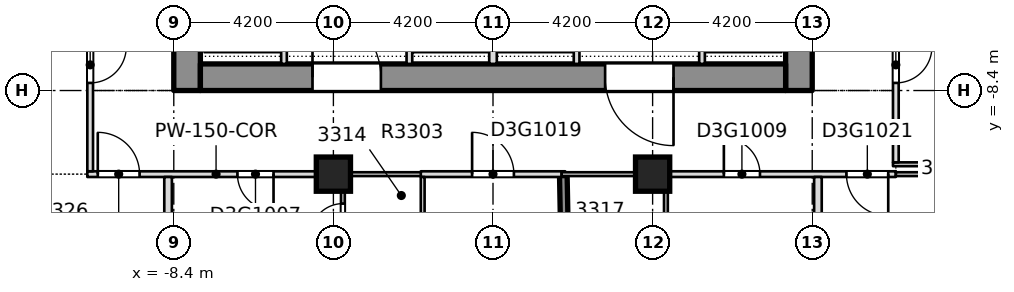
"""IFC4 building model, lengths in metres.
Left out: names, types, materials, properties, quantities, classifications, styles, units other than length and angle.
Written with IfcOpenShell. Run it as: python <this file> out.ifc"""

import sys

from ifc_helpers import new_model, si_unit, direction, frame, frame_2d, origin, origin_2d, place, context, subcontext, project, spatial, rectangle, extrude, element, fill, save


model = new_model("IFC4")
c1 = context("Model", 3, precision=1e-05, world=origin(), true_north=direction((0.0, 1.0)))
c2 = subcontext(c1, "Body", "Model", "MODEL_VIEW")
j1 = project(units=[si_unit("LENGTHUNIT", "METRE"), si_unit("PLANEANGLEUNIT", "RADIAN")], contexts=[c1])
p1 = place(None, origin())
s1 = spatial("IfcSite", under=j1, at=p1, CompositionType="ELEMENT")
p2 = place(p1, origin())
s2 = spatial("IfcBuilding", under=s1, at=p2, CompositionType="ELEMENT")
p3 = place(p2, frame((0.0, 0.0, 133.1)))
s3 = spatial("IfcBuildingStorey", under=s2, at=p3, CompositionType="ELEMENT", Elevation=133.1)
p4 = place(p3, frame((8.05, -8.4, -0.4), z_axis=(0.0, 0.0, 1.0), x_axis=(0.0, 1.0, 0.0)))
e1 = element("IfcWall", 1, at=p4, inside=s3, PredefinedType="SOLIDWALL", context=c2, shape_type="SweptSolid", body=[
    extrude(rectangle(XDim=30.15, YDim=0.7, at=frame_2d((15.075, 0.0))), origin(), (0.0, 0.0, 1.0), 3.45),
])
p5 = place(p4, frame((19.3, 0.0, 0.4)))
e2 = element("IfcOpeningElement", 2, at=p5, cuts=e1, PredefinedType="OPENING", context=c2, shape_type="SweptSolid", body=[
    extrude(rectangle(XDim=1.2, YDim=2.1, at=frame_2d((0.6, 1.05))), frame((0.0, 0.36, 0.0), z_axis=(0.0, -1.0, 0.0), x_axis=(1.0, 0.0, 0.0)), (0.0, 0.0, 1.0), 0.72),
])
p6 = place(p3, frame((-8.05, -8.4, -0.4), z_axis=(0.0, 0.0, 1.0), x_axis=(0.0, 1.0, 0.0)))
e3 = element("IfcWall", 3, at=p6, inside=s3, PredefinedType="SOLIDWALL", context=c2, shape_type="SweptSolid", body=[
    extrude(rectangle(XDim=30.15, YDim=0.7, at=frame_2d((15.075, 0.0))), origin(), (0.0, 0.0, 1.0), 3.45),
])
p7 = place(p6, frame((19.3, 0.0, 0.4)))
e4 = element("IfcOpeningElement", 4, at=p7, cuts=e3, PredefinedType="OPENING", context=c2, shape_type="SweptSolid", body=[
    extrude(rectangle(XDim=1.2, YDim=2.1, at=frame_2d((0.6, 1.05))), frame((0.0, 0.36, 0.0), z_axis=(0.0, -1.0, 0.0), x_axis=(1.0, 0.0, 0.0)), (0.0, 0.0, 1.0), 0.72),
])
p8 = place(p3, frame((-7.7, -8.05, -0.4), z_axis=(0.0, 0.0, 1.0), x_axis=(1.0, 0.0, 0.0)))
e5 = element("IfcWall", 5, at=p8, inside=s3, PredefinedType="SHEAR", context=c2, shape_type="SweptSolid", body=[
    extrude(rectangle(XDim=15.4, YDim=0.7, at=frame_2d((7.7, 0.0))), origin(), (0.0, 0.0, 1.0), 3.45),
])
p9 = place(p8, frame((2.95, 0.0, 0.4)))
e6 = element("IfcOpeningElement", 6, at=p9, cuts=e5, PredefinedType="OPENING", context=c2, shape_type="SweptSolid", body=[
    extrude(rectangle(XDim=1.8, YDim=2.1, at=frame_2d((0.9, 1.05))), frame((0.0, 0.36, 0.0), z_axis=(0.0, -1.0, 0.0), x_axis=(1.0, 0.0, 0.0)), (0.0, 0.0, 1.0), 0.72),
])
p10 = place(p8, frame((10.65, 0.0, 0.4)))
e7 = element("IfcOpeningElement", 7, at=p10, cuts=e5, PredefinedType="OPENING", context=c2, shape_type="SweptSolid", body=[
    extrude(rectangle(XDim=1.8, YDim=2.1, at=frame_2d((0.9, 1.05))), frame((0.0, 0.36, 0.0), z_axis=(0.0, -1.0, 0.0), x_axis=(1.0, 0.0, 0.0)), (0.0, 0.0, 1.0), 0.72),
])
for number, where, z_axis, x_axis in (
    (8, (-4.2, -10.6, -0.4), (0.0, 0.0, 1.0), (1.0, 0.0, 0.0)),
    (9, (4.2, -10.6, -0.4), (0.0, 0.0, 1.0), (1.0, 0.0, 0.0)),
):
    element("IfcColumn", number, at=place(p3, frame(where, z_axis=z_axis, x_axis=x_axis)), inside=s3, PredefinedType="COLUMN", context=c2, shape_type="SweptSolid", body=[
        extrude(rectangle(XDim=0.9, YDim=0.9, at=origin_2d()), origin(), (0.0, 0.0, 1.0), 3.45),
    ])
p11 = place(p3, frame((-10.675, -10.6, 0.0), z_axis=(0.0, 0.0, 1.0), x_axis=(1.0, 0.0, 0.0)))
e10 = element("IfcWall", 10, at=p11, inside=s3, PredefinedType="PARTITIONING", context=c2, shape_type="SweptSolid", body=[
    extrude(rectangle(XDim=6.775, YDim=0.15, at=frame_2d((3.388, 0.0))), origin(), (0.0, 0.0, 1.0), 3.05),
])
p12 = place(p11, frame((3.95, 0.0, 0.0)))
e11 = element("IfcOpeningElement", 11, at=p12, cuts=e10, PredefinedType="OPENING", context=c2, shape_type="SweptSolid", body=[
    extrude(rectangle(XDim=0.95, YDim=2.1, at=frame_2d((0.475, 1.05))), frame((0.0, 0.085, 0.0), z_axis=(0.0, -1.0, 0.0), x_axis=(1.0, 0.0, 0.0)), (0.0, 0.0, 1.0), 0.17),
])
p13 = place(p11, frame((0.275, 0.0, 0.0)))
e12 = element("IfcOpeningElement", 12, at=p13, cuts=e10, PredefinedType="OPENING", context=c2, shape_type="SweptSolid", body=[
    extrude(rectangle(XDim=1.1, YDim=2.1, at=frame_2d((0.55, 1.05))), frame((0.0, 0.085, 0.0), z_axis=(0.0, -1.0, 0.0), x_axis=(1.0, 0.0, 0.0)), (0.0, 0.0, 1.0), 0.17),
])
p14 = place(p3, frame((-4.0, -10.6, 0.0), z_axis=(0.0, 0.0, 1.0), x_axis=(1.0, 0.0, 0.0)))
e13 = element("IfcWall", 13, at=p14, inside=s3, PredefinedType="PARTITIONING", context=c2, shape_type="SweptSolid", body=[
    extrude(rectangle(XDim=2.2, YDim=0.1, at=frame_2d((1.1, 0.0))), origin(), (0.0, 0.0, 1.0), 3.05),
])
p15 = place(p3, frame((-1.9, -10.6, 0.0), z_axis=(0.0, 0.0, 1.0), x_axis=(1.0, 0.0, 0.0)))
e14 = element("IfcWall", 14, at=p15, inside=s3, PredefinedType="PARTITIONING", context=c2, shape_type="SweptSolid", body=[
    extrude(rectangle(XDim=3.8, YDim=0.15, at=frame_2d((1.9, 0.0))), origin(), (0.0, 0.0, 1.0), 3.05),
])
p16 = place(p15, frame((1.35, 0.0, 0.0)))
e15 = element("IfcOpeningElement", 15, at=p16, cuts=e14, PredefinedType="OPENING", context=c2, shape_type="SweptSolid", body=[
    extrude(rectangle(XDim=1.1, YDim=2.1, at=frame_2d((0.55, 1.05))), frame((0.0, 0.085, 0.0), z_axis=(0.0, -1.0, 0.0), x_axis=(1.0, 0.0, 0.0)), (0.0, 0.0, 1.0), 0.17),
])
p17 = place(p3, frame((1.8, -10.6, 0.0), z_axis=(0.0, 0.0, 1.0), x_axis=(1.0, 0.0, 0.0)))
e16 = element("IfcWall", 16, at=p17, inside=s3, PredefinedType="PARTITIONING", context=c2, shape_type="SweptSolid", body=[
    extrude(rectangle(XDim=2.8, YDim=0.1, at=frame_2d((1.4, 0.0))), origin(), (0.0, 0.0, 1.0), 3.05),
])
p18 = place(p3, frame((4.5, -10.6, 0.0), z_axis=(0.0, 0.0, 1.0), x_axis=(1.0, 0.0, 0.0)))
e17 = element("IfcWall", 17, at=p18, inside=s3, PredefinedType="PARTITIONING", context=c2, shape_type="SweptSolid", body=[
    extrude(rectangle(XDim=6.1, YDim=0.15, at=frame_2d((3.05, 0.0))), origin(), (0.0, 0.0, 1.0), 3.05),
])
p19 = place(p18, frame((1.575, 0.0, 0.0)))
e18 = element("IfcOpeningElement", 18, at=p19, cuts=e17, PredefinedType="OPENING", context=c2, shape_type="SweptSolid", body=[
    extrude(rectangle(XDim=0.95, YDim=2.1, at=frame_2d((0.475, 1.05))), frame((0.0, 0.085, 0.0), z_axis=(0.0, -1.0, 0.0), x_axis=(1.0, 0.0, 0.0)), (0.0, 0.0, 1.0), 0.17),
])
p20 = place(p18, frame((4.8, 0.0, 0.0)))
e19 = element("IfcOpeningElement", 19, at=p20, cuts=e17, PredefinedType="OPENING", context=c2, shape_type="SweptSolid", body=[
    extrude(rectangle(XDim=1.1, YDim=2.1, at=frame_2d((0.55, 1.05))), frame((0.0, 0.085, 0.0), z_axis=(0.0, -1.0, 0.0), x_axis=(1.0, 0.0, 0.0)), (0.0, 0.0, 1.0), 0.17),
])
p21 = place(p3, frame((10.6, -10.6, 0.0), z_axis=(0.0, 0.0, 1.0), x_axis=(1.0, 0.0, 0.0)))
e20 = element("IfcWall", 20, at=p21, inside=s3, PredefinedType="PARTITIONING", context=c2, shape_type="SweptSolid", body=[
    extrude(rectangle(XDim=1.7, YDim=0.1, at=frame_2d((0.85, 0.0))), origin(), (0.0, 0.0, 1.0), 3.05),
])
p22 = place(p3, frame((10.525, -10.34, 0.0), z_axis=(0.0, 0.0, 1.0), x_axis=(1.0, 0.0, 0.0)))
e21 = element("IfcWall", 21, at=p22, inside=s3, PredefinedType="PARTITIONING", context=c2, shape_type="SweptSolid", body=[
    extrude(rectangle(XDim=2.825, YDim=0.1, at=frame_2d((1.413, 0.0))), origin(), (0.0, 0.0, 1.0), 3.05),
])
p23 = place(p3, frame((-10.6, -10.525, 0.0), z_axis=(0.0, 0.0, 1.0), x_axis=(0.0, 1.0, 0.0)))
e22 = element("IfcWall", 22, at=p23, inside=s3, PredefinedType="PARTITIONING", context=c2, shape_type="SweptSolid", body=[
    extrude(rectangle(XDim=13.875, YDim=0.15, at=frame_2d((6.938, 0.0))), origin(), (0.0, 0.0, 1.0), 3.05),
])
p24 = place(p23, frame((2.325, 0.0, 0.0)))
e23 = element("IfcOpeningElement", 23, at=p24, cuts=e22, PredefinedType="OPENING", context=c2, shape_type="SweptSolid", body=[
    extrude(rectangle(XDim=0.95, YDim=2.1, at=frame_2d((0.475, 1.05))), frame((0.0, 0.085, 0.0), z_axis=(0.0, -1.0, 0.0), x_axis=(1.0, 0.0, 0.0)), (0.0, 0.0, 1.0), 0.17),
])
p25 = place(p23, frame((9.975, 0.0, 0.0)))
e24 = element("IfcOpeningElement", 24, at=p25, cuts=e22, PredefinedType="OPENING", context=c2, shape_type="SweptSolid", body=[
    extrude(rectangle(XDim=1.1, YDim=2.1, at=frame_2d((0.55, 1.05))), frame((0.0, 0.085, 0.0), z_axis=(0.0, -1.0, 0.0), x_axis=(1.0, 0.0, 0.0)), (0.0, 0.0, 1.0), 0.17),
])
p26 = place(p23, frame((4.825, 0.0, 0.0)))
e25 = element("IfcOpeningElement", 25, at=p26, cuts=e22, PredefinedType="OPENING", context=c2, shape_type="SweptSolid", body=[
    extrude(rectangle(XDim=1.0, YDim=2.1, at=frame_2d((0.5, 1.05))), frame((0.0, 0.085, 0.0), z_axis=(0.0, -1.0, 0.0), x_axis=(1.0, 0.0, 0.0)), (0.0, 0.0, 1.0), 0.17),
])
p27 = place(p23, frame((12.225, 0.0, 0.0)))
e26 = element("IfcOpeningElement", 26, at=p27, cuts=e22, PredefinedType="OPENING", context=c2, shape_type="SweptSolid", body=[
    extrude(rectangle(XDim=1.0, YDim=2.1, at=frame_2d((0.5, 1.05))), frame((0.0, 0.085, 0.0), z_axis=(0.0, -1.0, 0.0), x_axis=(1.0, 0.0, 0.0)), (0.0, 0.0, 1.0), 0.17),
])
p28 = place(p3, frame((-8.55, -13.1, 0.0), z_axis=(0.0, 0.0, 1.0), x_axis=(0.0, 1.0, 0.0)))
e27 = element("IfcWall", 27, at=p28, inside=s3, PredefinedType="PARTITIONING", context=c2, shape_type="SweptSolid", body=[
    extrude(rectangle(XDim=2.425, YDim=0.2, at=frame_2d((1.212, 0.0))), origin(), (0.0, 0.0, 1.0), 3.05),
])
p29 = place(p3, frame((-3.95, -12.95, 0.0), z_axis=(0.0, 0.0, 1.0), x_axis=(0.0, 1.0, 0.0)))
e28 = element("IfcWall", 28, at=p29, inside=s3, PredefinedType="PARTITIONING", context=c2, shape_type="SweptSolid", body=[
    extrude(rectangle(XDim=2.275, YDim=0.1, at=frame_2d((1.137, 0.0))), origin(), (0.0, 0.0, 1.0), 3.05),
])
p30 = place(p29, frame((0.725, 0.0, 0.0)))
e29 = element("IfcOpeningElement", 29, at=p30, cuts=e28, PredefinedType="OPENING", context=c2, shape_type="SweptSolid", body=[
    extrude(rectangle(XDim=0.85, YDim=2.1, at=frame_2d((0.425, 1.05))), frame((0.0, 0.06, 0.0), z_axis=(0.0, -1.0, 0.0), x_axis=(1.0, 0.0, 0.0)), (0.0, 0.0, 1.0), 0.12),
])
p31 = place(p3, frame((-1.85, -12.95, 0.0), z_axis=(0.0, 0.0, 1.0), x_axis=(0.0, 1.0, 0.0)))
e30 = element("IfcWall", 30, at=p31, inside=s3, PredefinedType="PARTITIONING", context=c2, shape_type="SweptSolid", body=[
    extrude(rectangle(XDim=2.275, YDim=0.1, at=frame_2d((1.137, 0.0))), origin(), (0.0, 0.0, 1.0), 3.05),
])
p32 = place(p3, frame((1.9, -13.248, 0.0), z_axis=(0.0, 0.0, 1.0), x_axis=(-0.019076944695, 0.999818018532, 0.0)))
e31 = element("IfcWall", 31, at=p32, inside=s3, PredefinedType="SOLIDWALL", context=c2, shape_type="SweptSolid", body=[
    extrude(rectangle(XDim=2.624, YDim=0.2, at=frame_2d((1.312, 0.0))), origin(), (0.0, 0.0, 1.0), 3.05),
])
p33 = place(p3, frame((4.55, -13.248, 0.0), z_axis=(0.0, 0.0, 1.0), x_axis=(0.0, 1.0, 0.0)))
e32 = element("IfcWall", 32, at=p33, inside=s3, PredefinedType="PARTITIONING", context=c2, shape_type="SweptSolid", body=[
    extrude(rectangle(XDim=2.573, YDim=0.1, at=frame_2d((1.287, 0.0))), origin(), (0.0, 0.0, 1.0), 3.05),
])
p34 = place(p3, frame((8.55, -13.1, 0.0), z_axis=(0.0, 0.0, 1.0), x_axis=(0.0, 1.0, 0.0)))
e33 = element("IfcWall", 33, at=p34, inside=s3, PredefinedType="PARTITIONING", context=c2, shape_type="SweptSolid", body=[
    extrude(rectangle(XDim=2.425, YDim=0.2, at=frame_2d((1.212, 0.0))), origin(), (0.0, 0.0, 1.0), 3.05),
])
p35 = place(p3, frame((10.6, -10.29, 0.0), z_axis=(0.0, 0.0, 1.0), x_axis=(0.0, 1.0, 0.0)))
e34 = element("IfcWall", 34, at=p35, inside=s3, PredefinedType="PARTITIONING", context=c2, shape_type="SweptSolid", body=[
    extrude(rectangle(XDim=13.64, YDim=0.15, at=frame_2d((6.82, 0.0))), origin(), (0.0, 0.0, 1.0), 3.05),
])
p36 = place(p35, frame((2.09, 0.0, 0.0)))
e35 = element("IfcOpeningElement", 35, at=p36, cuts=e34, PredefinedType="OPENING", context=c2, shape_type="SweptSolid", body=[
    extrude(rectangle(XDim=0.95, YDim=2.1, at=frame_2d((0.475, 1.05))), frame((0.0, 0.085, 0.0), z_axis=(0.0, -1.0, 0.0), x_axis=(1.0, 0.0, 0.0)), (0.0, 0.0, 1.0), 0.17),
])
p37 = place(p35, frame((9.74, 0.0, 0.0)))
e36 = element("IfcOpeningElement", 36, at=p37, cuts=e34, PredefinedType="OPENING", context=c2, shape_type="SweptSolid", body=[
    extrude(rectangle(XDim=1.1, YDim=2.1, at=frame_2d((0.55, 1.05))), frame((0.0, 0.085, 0.0), z_axis=(0.0, -1.0, 0.0), x_axis=(1.0, 0.0, 0.0)), (0.0, 0.0, 1.0), 0.17),
])
p38 = place(p35, frame((4.59, 0.0, 0.0)))
e37 = element("IfcOpeningElement", 37, at=p38, cuts=e34, PredefinedType="OPENING", context=c2, shape_type="SweptSolid", body=[
    extrude(rectangle(XDim=1.0, YDim=2.1, at=frame_2d((0.5, 1.05))), frame((0.0, 0.085, 0.0), z_axis=(0.0, -1.0, 0.0), x_axis=(1.0, 0.0, 0.0)), (0.0, 0.0, 1.0), 0.17),
])
p39 = place(p35, frame((11.99, 0.0, 0.0)))
e38 = element("IfcOpeningElement", 38, at=p39, cuts=e34, PredefinedType="OPENING", context=c2, shape_type="SweptSolid", body=[
    extrude(rectangle(XDim=1.0, YDim=2.1, at=frame_2d((0.5, 1.05))), frame((0.0, 0.085, 0.0), z_axis=(0.0, -1.0, 0.0), x_axis=(1.0, 0.0, 0.0)), (0.0, 0.0, 1.0), 0.17),
])
p40 = place(p3, frame((-5.5, -7.699, 0.0), z_axis=(0.0, 0.0, 1.0), x_axis=(0.0, 1.0, 0.0)))
e39 = element("IfcWall", 39, at=p40, inside=s3, PredefinedType="PARTITIONING", context=c2, shape_type="SweptSolid", body=[
    extrude(rectangle(XDim=12.124, YDim=0.15, at=frame_2d((6.062, 0.0))), origin(), (0.0, 0.0, 1.0), 3.05),
])
p41 = place(p40, frame((1.149, 0.0, 0.0)))
e40 = element("IfcOpeningElement", 40, at=p41, cuts=e39, PredefinedType="OPENING", context=c2, shape_type="SweptSolid", body=[
    extrude(rectangle(XDim=1.1, YDim=2.1, at=frame_2d((0.55, 1.05))), frame((0.0, 0.085, 0.0), z_axis=(0.0, -1.0, 0.0), x_axis=(1.0, 0.0, 0.0)), (0.0, 0.0, 1.0), 0.17),
])
p42 = place(p40, frame((4.149, 0.0, 0.0)))
e41 = element("IfcOpeningElement", 41, at=p42, cuts=e39, PredefinedType="OPENING", context=c2, shape_type="SweptSolid", body=[
    extrude(rectangle(XDim=1.1, YDim=2.1, at=frame_2d((0.55, 1.05))), frame((0.0, 0.085, 0.0), z_axis=(0.0, -1.0, 0.0), x_axis=(1.0, 0.0, 0.0)), (0.0, 0.0, 1.0), 0.17),
])
p43 = place(p40, frame((7.149, 0.0, 0.0)))
e42 = element("IfcOpeningElement", 42, at=p43, cuts=e39, PredefinedType="OPENING", context=c2, shape_type="SweptSolid", body=[
    extrude(rectangle(XDim=1.1, YDim=2.1, at=frame_2d((0.55, 1.05))), frame((0.0, 0.085, 0.0), z_axis=(0.0, -1.0, 0.0), x_axis=(1.0, 0.0, 0.0)), (0.0, 0.0, 1.0), 0.17),
])
p44 = place(p40, frame((10.149, 0.0, 0.0)))
e43 = element("IfcOpeningElement", 43, at=p44, cuts=e39, PredefinedType="OPENING", context=c2, shape_type="SweptSolid", body=[
    extrude(rectangle(XDim=1.1, YDim=2.1, at=frame_2d((0.55, 1.05))), frame((0.0, 0.085, 0.0), z_axis=(0.0, -1.0, 0.0), x_axis=(1.0, 0.0, 0.0)), (0.0, 0.0, 1.0), 0.17),
])
p45 = place(p3, frame((-2.2, -7.699, 0.0), z_axis=(0.0, 0.0, 1.0), x_axis=(0.0, 1.0, 0.0)))
e44 = element("IfcWall", 44, at=p45, inside=s3, PredefinedType="PARTITIONING", context=c2, shape_type="SweptSolid", body=[
    extrude(rectangle(XDim=12.124, YDim=0.15, at=frame_2d((6.062, 0.0))), origin(), (0.0, 0.0, 1.0), 3.05),
])
p46 = place(p45, frame((1.149, 0.0, 0.0)))
e45 = element("IfcOpeningElement", 45, at=p46, cuts=e44, PredefinedType="OPENING", context=c2, shape_type="SweptSolid", body=[
    extrude(rectangle(XDim=1.1, YDim=2.1, at=frame_2d((0.55, 1.05))), frame((0.0, 0.085, 0.0), z_axis=(0.0, -1.0, 0.0), x_axis=(1.0, 0.0, 0.0)), (0.0, 0.0, 1.0), 0.17),
])
p47 = place(p45, frame((5.724, 0.0, 0.0)))
e46 = element("IfcOpeningElement", 46, at=p47, cuts=e44, PredefinedType="OPENING", context=c2, shape_type="SweptSolid", body=[
    extrude(rectangle(XDim=0.95, YDim=2.1, at=frame_2d((0.475, 1.05))), frame((0.0, 0.085, 0.0), z_axis=(0.0, -1.0, 0.0), x_axis=(1.0, 0.0, 0.0)), (0.0, 0.0, 1.0), 0.17),
])
p48 = place(p45, frame((10.224, 0.0, 0.0)))
e47 = element("IfcOpeningElement", 47, at=p48, cuts=e44, PredefinedType="OPENING", context=c2, shape_type="SweptSolid", body=[
    extrude(rectangle(XDim=0.95, YDim=2.1, at=frame_2d((0.475, 1.05))), frame((0.0, 0.085, 0.0), z_axis=(0.0, -1.0, 0.0), x_axis=(1.0, 0.0, 0.0)), (0.0, 0.0, 1.0), 0.17),
])
p49 = place(p3, frame((0.0, -7.699, 0.0), z_axis=(0.0, 0.0, 1.0), x_axis=(0.0, 1.0, 0.0)))
e48 = element("IfcWall", 48, at=p49, inside=s3, PredefinedType="PARTITIONING", context=c2, shape_type="SweptSolid", body=[
    extrude(rectangle(XDim=12.124, YDim=0.2, at=frame_2d((6.062, 0.0))), origin(), (0.0, 0.0, 1.0), 3.05),
])
p50 = place(p3, frame((2.2, -7.699, 0.0), z_axis=(0.0, 0.0, 1.0), x_axis=(0.0, 1.0, 0.0)))
e49 = element("IfcWall", 49, at=p50, inside=s3, PredefinedType="PARTITIONING", context=c2, shape_type="SweptSolid", body=[
    extrude(rectangle(XDim=12.124, YDim=0.15, at=frame_2d((6.062, 0.0))), origin(), (0.0, 0.0, 1.0), 3.05),
])
p51 = place(p3, frame((5.5, -7.699, 0.0), z_axis=(0.0, 0.0, 1.0), x_axis=(0.0, 1.0, 0.0)))
e50 = element("IfcWall", 50, at=p51, inside=s3, PredefinedType="PARTITIONING", context=c2, shape_type="SweptSolid", body=[
    extrude(rectangle(XDim=12.124, YDim=0.15, at=frame_2d((6.062, 0.0))), origin(), (0.0, 0.0, 1.0), 3.05),
])
p52 = place(p51, frame((7.224, 0.0, 0.0)))
e51 = element("IfcOpeningElement", 51, at=p52, cuts=e50, PredefinedType="OPENING", context=c2, shape_type="SweptSolid", body=[
    extrude(rectangle(XDim=0.95, YDim=2.1, at=frame_2d((0.475, 1.05))), frame((0.0, 0.085, 0.0), z_axis=(0.0, -1.0, 0.0), x_axis=(1.0, 0.0, 0.0)), (0.0, 0.0, 1.0), 0.17),
])
p53 = place(p51, frame((10.224, 0.0, 0.0)))
e52 = element("IfcOpeningElement", 52, at=p53, cuts=e50, PredefinedType="OPENING", context=c2, shape_type="SweptSolid", body=[
    extrude(rectangle(XDim=0.95, YDim=2.1, at=frame_2d((0.475, 1.05))), frame((0.0, 0.085, 0.0), z_axis=(0.0, -1.0, 0.0), x_axis=(1.0, 0.0, 0.0)), (0.0, 0.0, 1.0), 0.17),
])
p54 = place(p24, origin())
e53 = element("IfcDoor", 53, at=p54, inside=s3, OperationType="SINGLE_SWING_RIGHT", PredefinedType="DOOR", context=c2, shape_type="SweptSolid", body=[
    extrude(rectangle(XDim=0.95, YDim=2.1, at=frame_2d((0.475, 1.05))), frame((0.0, 0.025, 0.0), z_axis=(0.0, -1.0, 0.0), x_axis=(1.0, 0.0, 0.0)), (0.0, 0.0, 1.0), 0.05),
])
fill(e23, e53)
p55 = place(p12, origin())
e54 = element("IfcDoor", 54, at=p55, inside=s3, OperationType="SINGLE_SWING_RIGHT", PredefinedType="DOOR", context=c2, shape_type="SweptSolid", body=[
    extrude(rectangle(XDim=0.95, YDim=2.1, at=frame_2d((0.475, 1.05))), frame((0.0, 0.025, 0.0), z_axis=(0.0, -1.0, 0.0), x_axis=(1.0, 0.0, 0.0)), (0.0, 0.0, 1.0), 0.05),
])
fill(e11, e54)
p56 = place(p30, origin())
e55 = element("IfcDoor", 55, at=p56, inside=s3, OperationType="SINGLE_SWING_RIGHT", PredefinedType="DOOR", context=c2, shape_type="SweptSolid", body=[
    extrude(rectangle(XDim=0.85, YDim=2.1, at=frame_2d((0.425, 1.05))), frame((0.0, 0.025, 0.0), z_axis=(0.0, -1.0, 0.0), x_axis=(1.0, 0.0, 0.0)), (0.0, 0.0, 1.0), 0.05),
])
fill(e29, e55)
p57 = place(p19, origin())
e56 = element("IfcDoor", 56, at=p57, inside=s3, OperationType="SINGLE_SWING_LEFT", PredefinedType="DOOR", context=c2, shape_type="SweptSolid", body=[
    extrude(rectangle(XDim=0.95, YDim=2.1, at=frame_2d((0.475, 1.05))), frame((0.0, 0.025, 0.0), z_axis=(0.0, -1.0, 0.0), x_axis=(1.0, 0.0, 0.0)), (0.0, 0.0, 1.0), 0.05),
])
fill(e18, e56)
p58 = place(p36, origin())
e57 = element("IfcDoor", 57, at=p58, inside=s3, OperationType="SINGLE_SWING_LEFT", PredefinedType="DOOR", context=c2, shape_type="SweptSolid", body=[
    extrude(rectangle(XDim=0.95, YDim=2.1, at=frame_2d((0.475, 1.05))), frame((0.0, 0.025, 0.0), z_axis=(0.0, -1.0, 0.0), x_axis=(1.0, 0.0, 0.0)), (0.0, 0.0, 1.0), 0.05),
])
fill(e35, e57)
p59 = place(p13, origin())
e58 = element("IfcDoor", 58, at=p59, inside=s3, OperationType="SINGLE_SWING_RIGHT", PredefinedType="DOOR", context=c2, shape_type="SweptSolid", body=[
    extrude(rectangle(XDim=1.1, YDim=2.1, at=frame_2d((0.55, 1.05))), frame((0.0, 0.025, 0.0), z_axis=(0.0, -1.0, 0.0), x_axis=(1.0, 0.0, 0.0)), (0.0, 0.0, 1.0), 0.05),
])
fill(e12, e58)
p60 = place(p16, origin())
e59 = element("IfcDoor", 59, at=p60, inside=s3, OperationType="SINGLE_SWING_RIGHT", PredefinedType="DOOR", context=c2, shape_type="SweptSolid", body=[
    extrude(rectangle(XDim=1.1, YDim=2.1, at=frame_2d((0.55, 1.05))), frame((0.0, 0.025, 0.0), z_axis=(0.0, -1.0, 0.0), x_axis=(1.0, 0.0, 0.0)), (0.0, 0.0, 1.0), 0.05),
])
fill(e15, e59)
p61 = place(p20, origin())
e60 = element("IfcDoor", 60, at=p61, inside=s3, OperationType="SINGLE_SWING_RIGHT", PredefinedType="DOOR", context=c2, shape_type="SweptSolid", body=[
    extrude(rectangle(XDim=1.1, YDim=2.1, at=frame_2d((0.55, 1.05))), frame((0.0, 0.025, 0.0), z_axis=(0.0, -1.0, 0.0), x_axis=(1.0, 0.0, 0.0)), (0.0, 0.0, 1.0), 0.05),
])
fill(e19, e60)
p62 = place(p9, origin())
e61 = element("IfcDoor", 61, at=p62, inside=s3, OperationType="SINGLE_SWING_LEFT", PredefinedType="DOOR", context=c2, shape_type="SweptSolid", body=[
    extrude(rectangle(XDim=1.8, YDim=2.1, at=frame_2d((0.9, 1.05))), frame((0.0, 0.025, 0.0), z_axis=(0.0, -1.0, 0.0), x_axis=(1.0, 0.0, 0.0)), (0.0, 0.0, 1.0), 0.05),
])
fill(e6, e61)
p63 = place(p10, origin())
e62 = element("IfcDoor", 62, at=p63, inside=s3, OperationType="SINGLE_SWING_LEFT", PredefinedType="DOOR", context=c2, shape_type="SweptSolid", body=[
    extrude(rectangle(XDim=1.8, YDim=2.1, at=frame_2d((0.9, 1.05))), frame((0.0, 0.025, 0.0), z_axis=(0.0, -1.0, 0.0), x_axis=(1.0, 0.0, 0.0)), (0.0, 0.0, 1.0), 0.05),
])
fill(e7, e62)
save(model, sys.argv[1])
